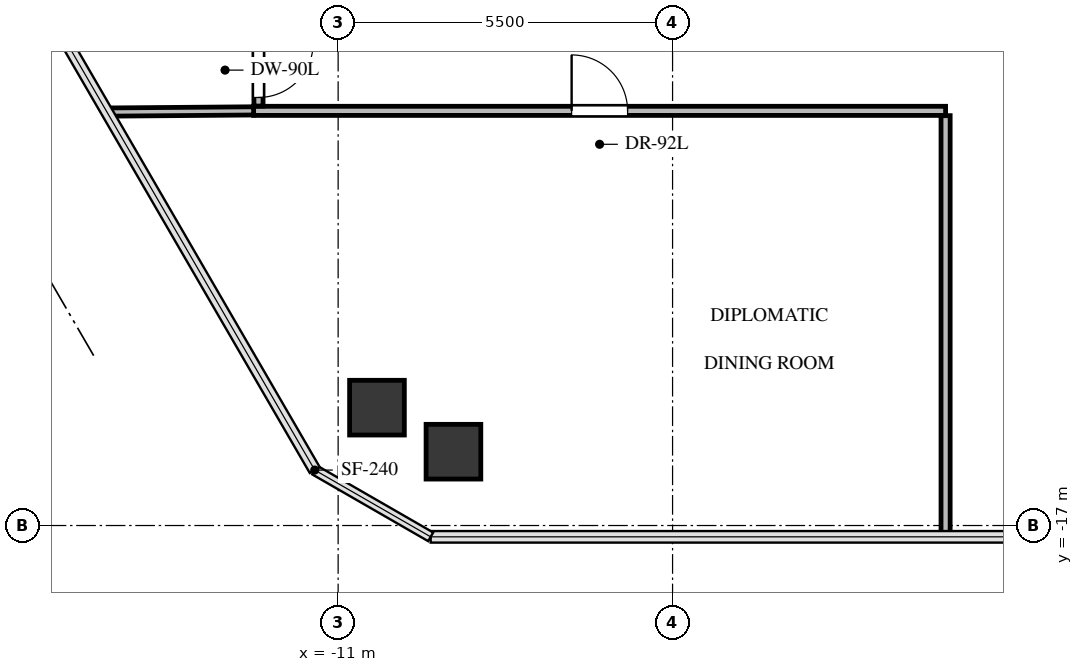
"""IFC4 building model, lengths in metres.
Left out: names, types, materials, properties, quantities, classifications, styles, units other than length and angle.
Written with IfcOpenShell. Run it as: python <this file> out.ifc"""

import sys

from ifc_helpers import new_model, si_unit, direction, frame, frame_2d, origin, origin_2d, place, context, subcontext, project, spatial, rectangle, extrude, source, transform, mapped, element, fill, save


model = new_model("IFC4")
c1 = context("Model", 3, precision=1e-05, world=origin(), true_north=direction((0.0, 1.0)))
c2 = subcontext(c1, "Body", "Model", "MODEL_VIEW")
j1 = project(units=[si_unit("LENGTHUNIT", "METRE"), si_unit("PLANEANGLEUNIT", "RADIAN")], contexts=[c1])
p1 = place(None, origin())
s1 = spatial("IfcSite", under=j1, at=p1, CompositionType="ELEMENT")
p2 = place(p1, origin())
s2 = spatial("IfcBuilding", under=s1, at=p2, CompositionType="ELEMENT")
p3 = place(p2, frame((0.0, 0.0, 224.9)))
s3 = spatial("IfcBuildingStorey", under=s2, at=p3, CompositionType="ELEMENT", Elevation=224.9)
m1 = source(origin(), c2, "Body", "SweptSolid", [
    extrude(rectangle(XDim=0.9, YDim=0.9, at=origin_2d()), origin(), (0.0, 0.0, 1.0), 3.3),
])
for number, where, z_axis, x_axis in (
    (1, (-10.361, -15.062, -0.24), (0.0, 0.0, 1.0), (1.0, 0.0, 0.0)),
    (2, (-9.104, -15.786, -0.24), (0.0, 0.0, 1.0), (1.0, 0.0, 0.0)),
):
    element("IfcColumn", number, at=place(p3, frame(where, z_axis=z_axis, x_axis=x_axis)), inside=s3, PredefinedType="COLUMN", context=c2, shape_type="MappedRepresentation", body=[
        mapped(m1, transform((0.0, 0.0, 0.0), x_axis=(1.0, 0.0, 0.0), y_axis=(0.0, 1.0, 0.0), z_axis=(0.0, 0.0, 1.0), scale=1.0)),
    ])
p4 = place(p3, frame((-12.39, -10.18, 0.0), z_axis=(0.0, 0.0, 1.0), x_axis=(1.0, 0.0, 0.0)))
e3 = element("IfcWall", 3, at=p4, inside=s3, PredefinedType="PARTITIONING", context=c2, shape_type="SweptSolid", body=[
    extrude(rectangle(XDim=11.38, YDim=0.15, at=frame_2d((5.69, 0.0))), origin(), (0.0, 0.0, 1.0), 2.302),
])
p5 = place(p4, frame((5.23, 0.0, 0.0)))
e4 = element("IfcOpeningElement", 4, at=p5, cuts=e3, PredefinedType="OPENING", context=c2, shape_type="SweptSolid", body=[
    extrude(rectangle(XDim=0.92, YDim=2.1, at=frame_2d((0.46, 1.05))), frame((0.0, 0.085, 0.0), z_axis=(0.0, -1.0, 0.0), x_axis=(1.0, 0.0, 0.0)), (0.0, 0.0, 1.0), 0.17),
])
p6 = place(p3, frame((-1.01, -10.259, 0.0), z_axis=(0.0, 0.0, 1.0), x_axis=(0.0, -1.0, 0.0)))
e5 = element("IfcWall", 5, at=p6, inside=s3, PredefinedType="PARTITIONING", context=c2, shape_type="SweptSolid", body=[
    extrude(rectangle(XDim=6.927, YDim=0.15, at=frame_2d((3.463, 0.0))), origin(), (0.0, 0.0, 1.0), 2.399),
])
p7 = place(p3, frame((-12.31, -8.919, 0.0), z_axis=(0.0, 0.0, 1.0), x_axis=(0.0, -1.0, 0.0)))
e6 = element("IfcWall", 6, at=p7, inside=s3, PredefinedType="PARTITIONING", context=c2, shape_type="SweptSolid", body=[
    extrude(rectangle(XDim=1.182, YDim=0.15, at=frame_2d((0.591, 0.0))), origin(), (0.0, 0.0, 1.0), 3.045),
])
p8 = place(p7, frame((0.141, 0.0, 0.0)))
e7 = element("IfcOpeningElement", 7, at=p8, cuts=e6, PredefinedType="OPENING", context=c2, shape_type="SweptSolid", body=[
    extrude(rectangle(XDim=0.9, YDim=2.05, at=frame_2d((0.45, 1.025))), frame((0.0, 0.085, 0.0), z_axis=(0.0, -1.0, 0.0), x_axis=(1.0, 0.0, 0.0)), (0.0, 0.0, 1.0), 0.17),
])
p9 = place(p3, frame((-14.802, -10.2, 0.0), z_axis=(0.0, 0.0, 1.0), x_axis=(0.999968020968, 0.007997314604, 0.0)))
e8 = element("IfcWall", 8, at=p9, inside=s3, PredefinedType="PARTITIONING", context=c2, shape_type="SweptSolid", body=[
    extrude(rectangle(XDim=2.412, YDim=0.135, at=frame_2d((1.206, 0.0))), origin(), (0.0, 0.0, 1.0), 2.399),
])
m2 = source(origin(), c2, "Body", "SweptSolid", [
    extrude(rectangle(XDim=0.92, YDim=2.1, at=frame_2d((0.46, 1.05))), frame((0.0, 0.025, 0.0), z_axis=(0.0, -1.0, 0.0), x_axis=(1.0, 0.0, 0.0)), (0.0, 0.0, 1.0), 0.05),
])
p10 = place(p5, origin())
e9 = element("IfcDoor", 9, at=p10, inside=s3, OperationType="SINGLE_SWING_LEFT", PredefinedType="DOOR", context=c2, shape_type="MappedRepresentation", body=[
    mapped(m2, transform((0.0, 0.0, 0.0), x_axis=(1.0, 0.0, 0.0), y_axis=(0.0, 1.0, 0.0), z_axis=(0.0, 0.0, 1.0), scale=1.0)),
])
fill(e4, e9)
m3 = source(origin(), c2, "Body", "SweptSolid", [
    extrude(rectangle(XDim=0.9, YDim=2.05, at=frame_2d((0.45, 1.025))), frame((0.0, 0.025, 0.0), z_axis=(0.0, -1.0, 0.0), x_axis=(1.0, 0.0, 0.0)), (0.0, 0.0, 1.0), 0.05),
])
p11 = place(p8, origin())
e10 = element("IfcDoor", 10, at=p11, inside=s3, OperationType="SINGLE_SWING_LEFT", PredefinedType="DOOR", context=c2, shape_type="MappedRepresentation", body=[
    mapped(m3, transform((0.0, 0.0, 0.0), x_axis=(1.0, 0.0, 0.0), y_axis=(0.0, 1.0, 0.0), z_axis=(0.0, 0.0, 1.0), scale=1.0)),
])
fill(e7, e10)
save(model, sys.argv[1])
